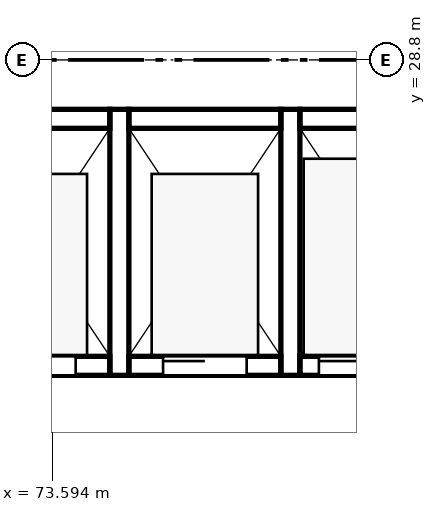
"""IFC4 building model, lengths in metres.
Left out: names, types, materials, properties, quantities, classifications, styles, units other than length and angle.
Written with IfcOpenShell. Run it as: python <this file> out.ifc"""

import sys

from ifc_helpers import new_model, si_unit, direction, frame, frame_2d, origin, place, context, subcontext, project, spatial, rectangle, extrude, element, fill, save


model = new_model("IFC4")
c1 = context("Model", 3, precision=1e-05, world=origin(), true_north=direction((0.0, 1.0)))
c2 = subcontext(c1, "Body", "Model", "MODEL_VIEW")
j1 = project(units=[si_unit("LENGTHUNIT", "METRE"), si_unit("PLANEANGLEUNIT", "RADIAN")], contexts=[c1])
p1 = place(None, origin())
s1 = spatial("IfcSite", under=j1, at=p1, CompositionType="ELEMENT")
p2 = place(p1, origin())
s2 = spatial("IfcBuilding", under=s1, at=p2, CompositionType="ELEMENT")
p3 = place(p2, frame((0.0, 0.0, -4.5)))
s3 = spatial("IfcBuildingStorey", under=s2, at=p3, CompositionType="ELEMENT", Elevation=-4.5)
for number, where, z_axis, x_axis in (
    (1, (74.475, 24.65, -1.6), (0.0, 0.0, 1.0), (0.0, 1.0, 0.0)),
    (2, (76.725, 24.65, -1.6), (0.0, 0.0, 1.0), (0.0, 1.0, 0.0)),
):
    element("IfcWall", number, at=place(p3, frame(where, z_axis=z_axis, x_axis=x_axis)), inside=s3, PredefinedType="SHEAR", context=c2, shape_type="SweptSolid", body=[
        extrude(rectangle(XDim=3.5, YDim=0.25, at=frame_2d((1.75, 0.0))), origin(), (0.0, 0.0, 1.0), 5.8),
    ])
p4 = place(p3, frame((72.35, 24.775, 0.0), z_axis=(0.0, 0.0, 1.0), x_axis=(1.0, 0.0, 0.0)))
e3 = element("IfcWall", 3, at=p4, inside=s3, PredefinedType="SHEAR", context=c2, shape_type="SweptSolid", body=[
    extrude(rectangle(XDim=2.0, YDim=0.25, at=frame_2d((1.0, 0.0))), origin(), (0.0, 0.0, 1.0), 4.2),
])
p5 = place(p4, frame((0.45, 0.0, 0.0)))
e4 = element("IfcOpeningElement", 4, at=p5, cuts=e3, PredefinedType="OPENING", context=c2, shape_type="SweptSolid", body=[
    extrude(rectangle(XDim=1.1, YDim=2.1, at=frame_2d((0.55, 1.05))), frame((0.0, 0.135, 0.0), z_axis=(0.0, -1.0, 0.0), x_axis=(1.0, 0.0, 0.0)), (0.0, 0.0, 1.0), 0.27),
])
p6 = place(p3, frame((72.35, 28.025, -1.6), z_axis=(0.0, 0.0, 1.0), x_axis=(1.0, 0.0, 0.0)))
e5 = element("IfcWall", 5, at=p6, inside=s3, PredefinedType="SHEAR", context=c2, shape_type="SweptSolid", body=[
    extrude(rectangle(XDim=2.0, YDim=0.25, at=frame_2d((1.0, 0.0))), origin(), (0.0, 0.0, 1.0), 5.8),
])
p7 = place(p3, frame((74.6, 24.775, 0.0), z_axis=(0.0, 0.0, 1.0), x_axis=(1.0, 0.0, 0.0)))
e6 = element("IfcWall", 6, at=p7, inside=s3, PredefinedType="SHEAR", context=c2, shape_type="SweptSolid", body=[
    extrude(rectangle(XDim=2.0, YDim=0.25, at=frame_2d((1.0, 0.0))), origin(), (0.0, 0.0, 1.0), 4.2),
])
p8 = place(p7, frame((0.45, 0.0, 0.0)))
e7 = element("IfcOpeningElement", 7, at=p8, cuts=e6, PredefinedType="OPENING", context=c2, shape_type="SweptSolid", body=[
    extrude(rectangle(XDim=1.1, YDim=2.1, at=frame_2d((0.55, 1.05))), frame((0.0, 0.135, 0.0), z_axis=(0.0, -1.0, 0.0), x_axis=(1.0, 0.0, 0.0)), (0.0, 0.0, 1.0), 0.27),
])
p9 = place(p3, frame((74.6, 28.025, -1.6), z_axis=(0.0, 0.0, 1.0), x_axis=(1.0, 0.0, 0.0)))
e8 = element("IfcWall", 8, at=p9, inside=s3, PredefinedType="SHEAR", context=c2, shape_type="SweptSolid", body=[
    extrude(rectangle(XDim=2.0, YDim=0.25, at=frame_2d((1.0, 0.0))), origin(), (0.0, 0.0, 1.0), 5.8),
])
p10 = place(p3, frame((76.85, 24.775, 0.0), z_axis=(0.0, 0.0, 1.0), x_axis=(1.0, 0.0, 0.0)))
e9 = element("IfcWall", 9, at=p10, inside=s3, PredefinedType="SHEAR", context=c2, shape_type="SweptSolid", body=[
    extrude(rectangle(XDim=2.0, YDim=0.25, at=frame_2d((1.0, 0.0))), origin(), (0.0, 0.0, 1.0), 4.2),
])
p11 = place(p10, frame((0.25, 0.0, 0.0)))
e10 = element("IfcOpeningElement", 10, at=p11, cuts=e9, PredefinedType="OPENING", context=c2, shape_type="SweptSolid", body=[
    extrude(rectangle(XDim=1.5, YDim=2.1, at=frame_2d((0.75, 1.05))), frame((0.0, 0.135, 0.0), z_axis=(0.0, -1.0, 0.0), x_axis=(1.0, 0.0, 0.0)), (0.0, 0.0, 1.0), 0.27),
])
p12 = place(p3, frame((76.85, 28.025, -1.6), z_axis=(0.0, 0.0, 1.0), x_axis=(1.0, 0.0, 0.0)))
e11 = element("IfcWall", 11, at=p12, inside=s3, PredefinedType="SHEAR", context=c2, shape_type="SweptSolid", body=[
    extrude(rectangle(XDim=2.0, YDim=0.25, at=frame_2d((1.0, 0.0))), origin(), (0.0, 0.0, 1.0), 5.8),
])
p13 = place(p5, origin())
e12 = element("IfcDoor", 12, at=p13, inside=s3, OperationType="SLIDING_TO_LEFT", PredefinedType="DOOR", context=c2, shape_type="SweptSolid", body=[
    extrude(rectangle(XDim=1.1, YDim=2.1, at=frame_2d((0.55, 1.05))), frame((0.0, 0.025, 0.0), z_axis=(0.0, -1.0, 0.0), x_axis=(1.0, 0.0, 0.0)), (0.0, 0.0, 1.0), 0.05),
])
fill(e4, e12)
p14 = place(p8, origin())
e13 = element("IfcDoor", 13, at=p14, inside=s3, OperationType="SLIDING_TO_LEFT", PredefinedType="DOOR", context=c2, shape_type="SweptSolid", body=[
    extrude(rectangle(XDim=1.1, YDim=2.1, at=frame_2d((0.55, 1.05))), frame((0.0, 0.025, 0.0), z_axis=(0.0, -1.0, 0.0), x_axis=(1.0, 0.0, 0.0)), (0.0, 0.0, 1.0), 0.05),
])
fill(e7, e13)
p15 = place(p11, origin())
e14 = element("IfcDoor", 14, at=p15, inside=s3, OperationType="SLIDING_TO_LEFT", PredefinedType="DOOR", context=c2, shape_type="SweptSolid", body=[
    extrude(rectangle(XDim=1.5, YDim=2.1, at=frame_2d((0.75, 1.05))), frame((0.0, 0.025, 0.0), z_axis=(0.0, -1.0, 0.0), x_axis=(1.0, 0.0, 0.0)), (0.0, 0.0, 1.0), 0.05),
])
fill(e10, e14)
save(model, sys.argv[1])
